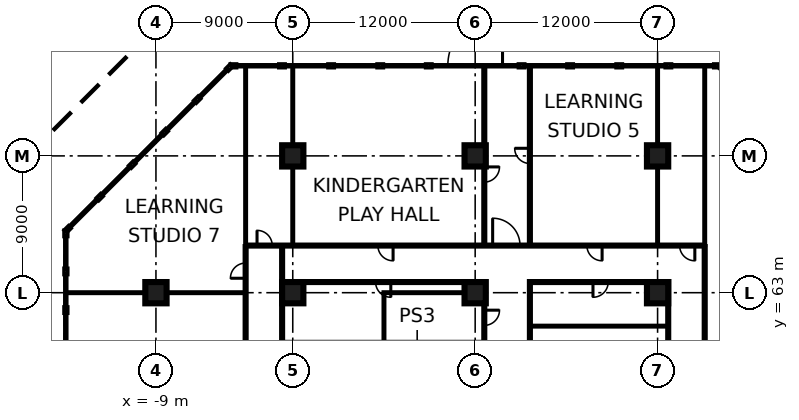
"""IFC4 building model, lengths in metres.
Left out: names, types, materials, properties, quantities, classifications, styles, units other than length and angle.
Written with IfcOpenShell. Run it as: python <this file> out.ifc"""

import sys

from ifc_helpers import new_model, si_unit, direction, frame, frame_2d, origin, origin_2d, place, context, subcontext, project, spatial, rectangle, extrude, element, fill, save


model = new_model("IFC4")
c1 = context("Model", 3, precision=1e-05, world=origin(), true_north=direction((0.0, 1.0)))
c2 = subcontext(c1, "Body", "Model", "MODEL_VIEW")
j1 = project(units=[si_unit("LENGTHUNIT", "METRE"), si_unit("PLANEANGLEUNIT", "RADIAN")], contexts=[c1])
p1 = place(None, origin())
s1 = spatial("IfcSite", under=j1, at=p1, CompositionType="ELEMENT")
p2 = place(p1, origin())
s2 = spatial("IfcBuilding", under=s1, at=p2, CompositionType="ELEMENT")
p3 = place(p2, origin())
s3 = spatial("IfcBuildingStorey", under=s2, at=p3, CompositionType="ELEMENT", Elevation=0.0)
for number, where, z_axis, x_axis in (
    (1, (-9.0, 63.0, 0.0), (0.0, 0.0, 1.0), (1.0, 0.0, 0.0)),
    (2, (0.0, 63.0, 0.0), (0.0, 0.0, 1.0), (1.0, 0.0, 0.0)),
    (3, (12.0, 63.0, 0.0), (0.0, 0.0, 1.0), (1.0, 0.0, 0.0)),
    (4, (24.0, 63.0, 0.0), (0.0, 0.0, 1.0), (1.0, 0.0, 0.0)),
    (5, (0.0, 72.0, 0.0), (0.0, 0.0, 1.0), (1.0, 0.0, 0.0)),
    (6, (12.0, 72.0, 0.0), (0.0, 0.0, 1.0), (1.0, 0.0, 0.0)),
    (7, (24.0, 72.0, 0.0), (0.0, 0.0, 1.0), (1.0, 0.0, 0.0)),
):
    element("IfcColumn", number, at=place(p3, frame(where, z_axis=z_axis, x_axis=x_axis)), inside=s3, PredefinedType="COLUMN", context=c2, shape_type="SweptSolid", body=[
        extrude(rectangle(XDim=1.4, YDim=1.4, at=origin_2d()), origin(), (0.0, 0.0, 1.0), 7.2),
    ])
p4 = place(p3, frame((15.0, 77.925, 0.0), z_axis=(0.0, 0.0, 1.0), x_axis=(-1.0, 0.0, 0.0)))
e8 = element("IfcWall", 8, at=p4, inside=s3, PredefinedType="SOLIDWALL", context=c2, shape_type="SweptSolid", body=[
    extrude(rectangle(XDim=6.0, YDim=0.15, at=frame_2d((3.0, 0.0))), origin(), (0.0, 0.0, 1.0), 6.8),
])
p5 = place(p4, frame((1.2, 0.0, 0.0)))
e9 = element("IfcOpeningElement", 9, at=p5, cuts=e8, PredefinedType="OPENING", context=c2, shape_type="SweptSolid", body=[
    extrude(rectangle(XDim=3.6, YDim=2.8, at=frame_2d((1.8, 1.4))), frame((0.0, 0.085, 0.0), z_axis=(0.0, -1.0, 0.0), x_axis=(1.0, 0.0, 0.0)), (0.0, 0.0, 1.0), 0.17),
])
p6 = place(p3, frame((-14.925, 63.0, 0.0), z_axis=(0.0, 0.0, 1.0), x_axis=(1.0, 0.0, 0.0)))
e10 = element("IfcWall", 10, at=p6, inside=s3, PredefinedType="PARTITIONING", context=c2, shape_type="SweptSolid", body=[
    extrude(rectangle(XDim=11.725, YDim=0.125, at=frame_2d((5.863, 0.0))), origin(), (0.0, 0.0, 1.0), 6.8),
])
p7 = place(p3, frame((-3.1, -3.0, 0.0), z_axis=(0.0, 0.0, 1.0), x_axis=(0.0, 1.0, 0.0)))
e11 = element("IfcWall", 11, at=p7, inside=s3, PredefinedType="PARTITIONING", context=c2, shape_type="SweptSolid", body=[
    extrude(rectangle(XDim=69.1, YDim=0.2, at=frame_2d((34.55, 0.0))), origin(), (0.0, 0.0, 1.0), 6.8),
])
p8 = place(p7, frame((8.6, 0.0, 0.0)))
e12 = element("IfcOpeningElement", 12, at=p8, cuts=e11, PredefinedType="OPENING", context=c2, shape_type="SweptSolid", body=[
    extrude(rectangle(XDim=1.0, YDim=2.1, at=frame_2d((0.5, 1.05))), frame((0.0, 0.11, 0.0), z_axis=(0.0, -1.0, 0.0), x_axis=(1.0, 0.0, 0.0)), (0.0, 0.0, 1.0), 0.22),
])
p9 = place(p7, frame((13.85, 0.0, 0.0)))
e13 = element("IfcOpeningElement", 13, at=p9, cuts=e11, PredefinedType="OPENING", context=c2, shape_type="SweptSolid", body=[
    extrude(rectangle(XDim=1.0, YDim=2.1, at=frame_2d((0.5, 1.05))), frame((0.0, 0.11, 0.0), z_axis=(0.0, -1.0, 0.0), x_axis=(1.0, 0.0, 0.0)), (0.0, 0.0, 1.0), 0.22),
])
p10 = place(p7, frame((18.6, 0.0, 0.0)))
e14 = element("IfcOpeningElement", 14, at=p10, cuts=e11, PredefinedType="OPENING", context=c2, shape_type="SweptSolid", body=[
    extrude(rectangle(XDim=1.0, YDim=2.1, at=frame_2d((0.5, 1.05))), frame((0.0, 0.11, 0.0), z_axis=(0.0, -1.0, 0.0), x_axis=(1.0, 0.0, 0.0)), (0.0, 0.0, 1.0), 0.22),
])
p11 = place(p7, frame((66.95, 0.0, 0.0)))
e15 = element("IfcOpeningElement", 15, at=p11, cuts=e11, PredefinedType="OPENING", context=c2, shape_type="SweptSolid", body=[
    extrude(rectangle(XDim=1.0, YDim=2.1, at=frame_2d((0.5, 1.05))), frame((0.0, 0.11, 0.0), z_axis=(0.0, -1.0, 0.0), x_axis=(1.0, 0.0, 0.0)), (0.0, 0.0, 1.0), 0.22),
])
p12 = place(p7, frame((59.85, 0.0, 0.0)))
e16 = element("IfcOpeningElement", 16, at=p12, cuts=e11, PredefinedType="OPENING", context=c2, shape_type="SweptSolid", body=[
    extrude(rectangle(XDim=1.8, YDim=2.1, at=frame_2d((0.9, 1.05))), frame((0.0, 0.11, 0.0), z_axis=(0.0, -1.0, 0.0), x_axis=(1.0, 0.0, 0.0)), (0.0, 0.0, 1.0), 0.22),
])
p13 = place(p7, frame((49.85, 0.0, 0.0)))
e17 = element("IfcOpeningElement", 17, at=p13, cuts=e11, PredefinedType="OPENING", context=c2, shape_type="SweptSolid", body=[
    extrude(rectangle(XDim=1.8, YDim=2.1, at=frame_2d((0.9, 1.05))), frame((0.0, 0.11, 0.0), z_axis=(0.0, -1.0, 0.0), x_axis=(1.0, 0.0, 0.0)), (0.0, 0.0, 1.0), 0.22),
])
p14 = place(p7, frame((29.85, 0.0, 0.0)))
e18 = element("IfcOpeningElement", 18, at=p14, cuts=e11, PredefinedType="OPENING", context=c2, shape_type="SweptSolid", body=[
    extrude(rectangle(XDim=1.8, YDim=2.1, at=frame_2d((0.9, 1.05))), frame((0.0, 0.11, 0.0), z_axis=(0.0, -1.0, 0.0), x_axis=(1.0, 0.0, 0.0)), (0.0, 0.0, 1.0), 0.22),
])
p15 = place(p7, frame((39.6, 0.0, 0.0)))
e19 = element("IfcOpeningElement", 19, at=p15, cuts=e11, PredefinedType="OPENING", context=c2, shape_type="SweptSolid", body=[
    extrude(rectangle(XDim=1.8, YDim=2.1, at=frame_2d((0.9, 1.05))), frame((0.0, 0.11, 0.0), z_axis=(0.0, -1.0, 0.0), x_axis=(1.0, 0.0, 0.0)), (0.0, 0.0, 1.0), 0.22),
])
p16 = place(p7, frame((23.55, 0.0, 0.0)))
e20 = element("IfcOpeningElement", 20, at=p16, cuts=e11, PredefinedType="OPENING", context=c2, shape_type="SweptSolid", body=[
    extrude(rectangle(XDim=1.8, YDim=2.1, at=frame_2d((0.9, 1.05))), frame((0.0, 0.11, 0.0), z_axis=(0.0, -1.0, 0.0), x_axis=(1.0, 0.0, 0.0)), (0.0, 0.0, 1.0), 0.22),
])
p17 = place(p3, frame((-3.1, 66.1, 0.0), z_axis=(0.0, 0.0, 1.0), x_axis=(0.0, 1.0, 0.0)))
e21 = element("IfcWall", 21, at=p17, inside=s3, PredefinedType="PARTITIONING", context=c2, shape_type="SweptSolid", body=[
    extrude(rectangle(XDim=11.825, YDim=0.125, at=frame_2d((5.913, 0.0))), origin(), (0.0, 0.0, 1.0), 6.8),
])
p18 = place(p3, frame((-3.0, 66.1, 0.0), z_axis=(0.0, 0.0, 1.0), x_axis=(1.0, 0.0, 0.0)))
e22 = element("IfcWall", 22, at=p18, inside=s3, PredefinedType="PARTITIONING", context=c2, shape_type="SweptSolid", body=[
    extrude(rectangle(XDim=30.0, YDim=0.2, at=frame_2d((15.0, 0.0))), origin(), (0.0, 0.0, 1.0), 6.8),
])
p19 = place(p18, frame((0.65, 0.0, 0.0)))
e23 = element("IfcOpeningElement", 23, at=p19, cuts=e22, PredefinedType="OPENING", context=c2, shape_type="SweptSolid", body=[
    extrude(rectangle(XDim=1.0, YDim=2.1, at=frame_2d((0.5, 1.05))), frame((0.0, 0.11, 0.0), z_axis=(0.0, -1.0, 0.0), x_axis=(1.0, 0.0, 0.0)), (0.0, 0.0, 1.0), 0.22),
])
p20 = place(p18, frame((8.6, 0.0, 0.0)))
e24 = element("IfcOpeningElement", 24, at=p20, cuts=e22, PredefinedType="OPENING", context=c2, shape_type="SweptSolid", body=[
    extrude(rectangle(XDim=1.0, YDim=2.1, at=frame_2d((0.5, 1.05))), frame((0.0, 0.11, 0.0), z_axis=(0.0, -1.0, 0.0), x_axis=(1.0, 0.0, 0.0)), (0.0, 0.0, 1.0), 0.22),
])
p21 = place(p18, frame((22.35, 0.0, 0.0)))
e25 = element("IfcOpeningElement", 25, at=p21, cuts=e22, PredefinedType="OPENING", context=c2, shape_type="SweptSolid", body=[
    extrude(rectangle(XDim=1.0, YDim=2.1, at=frame_2d((0.5, 1.05))), frame((0.0, 0.11, 0.0), z_axis=(0.0, -1.0, 0.0), x_axis=(1.0, 0.0, 0.0)), (0.0, 0.0, 1.0), 0.22),
])
p22 = place(p18, frame((28.45, 0.0, 0.0)))
e26 = element("IfcOpeningElement", 26, at=p22, cuts=e22, PredefinedType="OPENING", context=c2, shape_type="SweptSolid", body=[
    extrude(rectangle(XDim=1.0, YDim=2.1, at=frame_2d((0.5, 1.05))), frame((0.0, 0.11, 0.0), z_axis=(0.0, -1.0, 0.0), x_axis=(1.0, 0.0, 0.0)), (0.0, 0.0, 1.0), 0.22),
])
p23 = place(p18, frame((16.15, 0.0, 0.0)))
e27 = element("IfcOpeningElement", 27, at=p23, cuts=e22, PredefinedType="OPENING", context=c2, shape_type="SweptSolid", body=[
    extrude(rectangle(XDim=1.8, YDim=2.1, at=frame_2d((0.9, 1.05))), frame((0.0, 0.11, 0.0), z_axis=(0.0, -1.0, 0.0), x_axis=(1.0, 0.0, 0.0)), (0.0, 0.0, 1.0), 0.22),
])
p24 = place(p3, frame((-0.7, 59.6, 0.0), z_axis=(0.0, 0.0, 1.0), x_axis=(0.0, 1.0, 0.0)))
e28 = element("IfcWall", 28, at=p24, inside=s3, PredefinedType="PARTITIONING", context=c2, shape_type="SweptSolid", body=[
    extrude(rectangle(XDim=6.4, YDim=0.2, at=frame_2d((3.2, 0.0))), origin(), (0.0, 0.0, 1.0), 6.8),
])
p25 = place(p3, frame((-0.6, 63.7, 0.0), z_axis=(0.0, 0.0, 1.0), x_axis=(1.0, 0.0, 0.0)))
e29 = element("IfcWall", 29, at=p25, inside=s3, PredefinedType="PARTITIONING", context=c2, shape_type="SweptSolid", body=[
    extrude(rectangle(XDim=13.3, YDim=0.2, at=frame_2d((6.65, 0.0))), origin(), (0.0, 0.0, 1.0), 6.8),
])
p26 = place(p25, frame((6.05, 0.0, 0.0)))
e30 = element("IfcOpeningElement", 30, at=p26, cuts=e29, PredefinedType="OPENING", context=c2, shape_type="SweptSolid", body=[
    extrude(rectangle(XDim=1.0, YDim=2.1, at=frame_2d((0.5, 1.05))), frame((0.0, 0.11, 0.0), z_axis=(0.0, -1.0, 0.0), x_axis=(1.0, 0.0, 0.0)), (0.0, 0.0, 1.0), 0.22),
])
p27 = place(p3, frame((0.0, 66.2, 0.0), z_axis=(0.0, 0.0, 1.0), x_axis=(0.0, 1.0, 0.0)))
e31 = element("IfcWall", 31, at=p27, inside=s3, PredefinedType="PARTITIONING", context=c2, shape_type="SweptSolid", body=[
    extrude(rectangle(XDim=11.725, YDim=0.125, at=frame_2d((5.863, 0.0))), origin(), (0.0, 0.0, 1.0), 6.8),
])
p28 = place(p3, frame((5.938, 63.0, 0.0), z_axis=(0.0, 0.0, 1.0), x_axis=(1.0, 0.0, 0.0)))
e32 = element("IfcWall", 32, at=p28, inside=s3, PredefinedType="PARTITIONING", context=c2, shape_type="SweptSolid", body=[
    extrude(rectangle(XDim=6.562, YDim=0.125, at=frame_2d((3.281, 0.0))), origin(), (0.0, 0.0, 1.0), 6.8),
])
p29 = place(p3, frame((6.0, 59.7, 0.0), z_axis=(0.0, 0.0, 1.0), x_axis=(0.0, 1.0, 0.0)))
e33 = element("IfcWall", 33, at=p29, inside=s3, PredefinedType="PARTITIONING", context=c2, shape_type="SweptSolid", body=[
    extrude(rectangle(XDim=3.238, YDim=0.125, at=frame_2d((1.619, 0.0))), origin(), (0.0, 0.0, 1.0), 6.8),
])
p30 = place(p3, frame((12.6, 59.6, 0.0), z_axis=(0.0, 0.0, 1.0), x_axis=(0.0, 1.0, 0.0)))
e34 = element("IfcWall", 34, at=p30, inside=s3, PredefinedType="PARTITIONING", context=c2, shape_type="SweptSolid", body=[
    extrude(rectangle(XDim=4.0, YDim=0.2, at=frame_2d((2.0, 0.0))), origin(), (0.0, 0.0, 1.0), 6.8),
])
p31 = place(p30, frame((1.25, 0.0, 0.0)))
e35 = element("IfcOpeningElement", 35, at=p31, cuts=e34, PredefinedType="OPENING", context=c2, shape_type="SweptSolid", body=[
    extrude(rectangle(XDim=1.0, YDim=2.1, at=frame_2d((0.5, 1.05))), frame((0.0, 0.11, 0.0), z_axis=(0.0, -1.0, 0.0), x_axis=(1.0, 0.0, 0.0)), (0.0, 0.0, 1.0), 0.22),
])
p32 = place(p3, frame((12.6, 66.2, 0.0), z_axis=(0.0, 0.0, 1.0), x_axis=(0.0, 1.0, 0.0)))
e36 = element("IfcWall", 36, at=p32, inside=s3, PredefinedType="PARTITIONING", context=c2, shape_type="SweptSolid", body=[
    extrude(rectangle(XDim=11.651, YDim=0.2, at=frame_2d((5.826, 0.0))), origin(), (0.0, 0.0, 1.0), 6.8),
])
p33 = place(p32, frame((4.075, 0.0, 0.0)))
e37 = element("IfcOpeningElement", 37, at=p33, cuts=e36, PredefinedType="OPENING", context=c2, shape_type="SweptSolid", body=[
    extrude(rectangle(XDim=1.0, YDim=2.1, at=frame_2d((0.5, 1.05))), frame((0.0, 0.11, 0.0), z_axis=(0.0, -1.0, 0.0), x_axis=(1.0, 0.0, 0.0)), (0.0, 0.0, 1.0), 0.22),
])
p34 = place(p3, frame((15.6, 51.225, 0.0), z_axis=(0.0, 0.0, 1.0), x_axis=(0.0, 1.0, 0.0)))
e38 = element("IfcWall", 38, at=p34, inside=s3, PredefinedType="PARTITIONING", context=c2, shape_type="SweptSolid", body=[
    extrude(rectangle(XDim=12.575, YDim=0.2, at=frame_2d((6.288, 0.0))), origin(), (0.0, 0.0, 1.0), 6.8),
])
p35 = place(p34, frame((6.025, 0.0, 0.0)))
e39 = element("IfcOpeningElement", 39, at=p35, cuts=e38, PredefinedType="OPENING", context=c2, shape_type="SweptSolid", body=[
    extrude(rectangle(XDim=1.0, YDim=2.1, at=frame_2d((0.5, 1.05))), frame((0.0, 0.11, 0.0), z_axis=(0.0, -1.0, 0.0), x_axis=(1.0, 0.0, 0.0)), (0.0, 0.0, 1.0), 0.22),
])
p36 = place(p3, frame((15.6, 66.2, 0.0), z_axis=(0.0, 0.0, 1.0), x_axis=(0.0, 1.0, 0.0)))
e40 = element("IfcWall", 40, at=p36, inside=s3, PredefinedType="PARTITIONING", context=c2, shape_type="SweptSolid", body=[
    extrude(rectangle(XDim=11.725, YDim=0.2, at=frame_2d((5.863, 0.0))), origin(), (0.0, 0.0, 1.0), 6.8),
])
p37 = place(p36, frame((5.3, 0.0, 0.0)))
e41 = element("IfcOpeningElement", 41, at=p37, cuts=e40, PredefinedType="OPENING", context=c2, shape_type="SweptSolid", body=[
    extrude(rectangle(XDim=1.0, YDim=2.1, at=frame_2d((0.5, 1.05))), frame((0.0, 0.11, 0.0), z_axis=(0.0, -1.0, 0.0), x_axis=(1.0, 0.0, 0.0)), (0.0, 0.0, 1.0), 0.22),
])
p38 = place(p3, frame((15.7, 60.8, 0.0), z_axis=(0.0, 0.0, 1.0), x_axis=(1.0, 0.0, 0.0)))
e42 = element("IfcWall", 42, at=p38, inside=s3, PredefinedType="PARTITIONING", context=c2, shape_type="SweptSolid", body=[
    extrude(rectangle(XDim=8.9, YDim=0.125, at=frame_2d((4.45, 0.0))), origin(), (0.0, 0.0, 1.0), 6.8),
])
p39 = place(p3, frame((15.7, 63.7, 0.0), z_axis=(0.0, 0.0, 1.0), x_axis=(1.0, 0.0, 0.0)))
e43 = element("IfcWall", 43, at=p39, inside=s3, PredefinedType="PARTITIONING", context=c2, shape_type="SweptSolid", body=[
    extrude(rectangle(XDim=8.9, YDim=0.2, at=frame_2d((4.45, 0.0))), origin(), (0.0, 0.0, 1.0), 6.8),
])
p40 = place(p39, frame((4.05, 0.0, 0.0)))
e44 = element("IfcOpeningElement", 44, at=p40, cuts=e43, PredefinedType="OPENING", context=c2, shape_type="SweptSolid", body=[
    extrude(rectangle(XDim=1.0, YDim=2.1, at=frame_2d((0.5, 1.05))), frame((0.0, 0.11, 0.0), z_axis=(0.0, -1.0, 0.0), x_axis=(1.0, 0.0, 0.0)), (0.0, 0.0, 1.0), 0.22),
])
p41 = place(p3, frame((24.0, 66.2, 0.0), z_axis=(0.0, 0.0, 1.0), x_axis=(0.0, 1.0, 0.0)))
e45 = element("IfcWall", 45, at=p41, inside=s3, PredefinedType="PARTITIONING", context=c2, shape_type="SweptSolid", body=[
    extrude(rectangle(XDim=11.725, YDim=0.125, at=frame_2d((5.863, 0.0))), origin(), (0.0, 0.0, 1.0), 6.8),
])
p42 = place(p3, frame((24.7, 44.3, 0.0), z_axis=(0.0, 0.0, 1.0), x_axis=(0.0, 1.0, 0.0)))
e46 = element("IfcWall", 46, at=p42, inside=s3, PredefinedType="PARTITIONING", context=c2, shape_type="SweptSolid", body=[
    extrude(rectangle(XDim=19.5, YDim=0.2, at=frame_2d((9.75, 0.0))), origin(), (0.0, 0.0, 1.0), 6.8),
])
p43 = place(p42, frame((1.45, 0.0, 0.0)))
e47 = element("IfcOpeningElement", 47, at=p43, cuts=e46, PredefinedType="OPENING", context=c2, shape_type="SweptSolid", body=[
    extrude(rectangle(XDim=1.0, YDim=2.1, at=frame_2d((0.5, 1.05))), frame((0.0, 0.11, 0.0), z_axis=(0.0, -1.0, 0.0), x_axis=(1.0, 0.0, 0.0)), (0.0, 0.0, 1.0), 0.22),
])
p44 = place(p42, frame((6.65, 0.0, 0.0)))
e48 = element("IfcOpeningElement", 48, at=p44, cuts=e46, PredefinedType="OPENING", context=c2, shape_type="SweptSolid", body=[
    extrude(rectangle(XDim=1.0, YDim=2.1, at=frame_2d((0.5, 1.05))), frame((0.0, 0.11, 0.0), z_axis=(0.0, -1.0, 0.0), x_axis=(1.0, 0.0, 0.0)), (0.0, 0.0, 1.0), 0.22),
])
p45 = place(p3, frame((27.1, 38.5, 0.0), z_axis=(0.0, 0.0, 1.0), x_axis=(0.0, 1.0, 0.0)))
e49 = element("IfcWall", 49, at=p45, inside=s3, PredefinedType="PARTITIONING", context=c2, shape_type="SweptSolid", body=[
    extrude(rectangle(XDim=27.6, YDim=0.2, at=frame_2d((13.8, 0.0))), origin(), (0.0, 0.0, 1.0), 6.8),
])
p46 = place(p45, frame((13.05, 0.0, 0.0)))
e50 = element("IfcOpeningElement", 50, at=p46, cuts=e49, PredefinedType="OPENING", context=c2, shape_type="SweptSolid", body=[
    extrude(rectangle(XDim=1.8, YDim=2.1, at=frame_2d((0.9, 1.05))), frame((0.0, 0.11, 0.0), z_axis=(0.0, -1.0, 0.0), x_axis=(1.0, 0.0, 0.0)), (0.0, 0.0, 1.0), 0.22),
])
p47 = place(p45, frame((3.05, 0.0, 0.0)))
e51 = element("IfcOpeningElement", 51, at=p47, cuts=e49, PredefinedType="OPENING", context=c2, shape_type="SweptSolid", body=[
    extrude(rectangle(XDim=1.8, YDim=2.1, at=frame_2d((0.9, 1.05))), frame((0.0, 0.11, 0.0), z_axis=(0.0, -1.0, 0.0), x_axis=(1.0, 0.0, 0.0)), (0.0, 0.0, 1.0), 0.22),
])
p48 = place(p3, frame((27.1, 66.1, 0.0), z_axis=(0.0, 0.0, 1.0), x_axis=(0.0, 1.0, 0.0)))
e52 = element("IfcWall", 52, at=p48, inside=s3, PredefinedType="PARTITIONING", context=c2, shape_type="SweptSolid", body=[
    extrude(rectangle(XDim=11.825, YDim=0.125, at=frame_2d((5.913, 0.0))), origin(), (0.0, 0.0, 1.0), 6.8),
])
p49 = place(p5, frame((3.6, 0.0, 0.0), z_axis=(0.0, 0.0, 1.0), x_axis=(-1.0, 0.0, 0.0)))
e53 = element("IfcDoor", 53, at=p49, inside=s3, OperationType="DOUBLE_DOOR_SINGLE_SWING", PredefinedType="DOOR", context=c2, shape_type="SweptSolid", body=[
    extrude(rectangle(XDim=3.6, YDim=2.8, at=frame_2d((1.8, 1.4))), frame((0.0, 0.025, 0.0), z_axis=(0.0, -1.0, 0.0), x_axis=(1.0, 0.0, 0.0)), (0.0, 0.0, 1.0), 0.05),
])
fill(e9, e53)
p50 = place(p31, origin())
e54 = element("IfcDoor", 54, at=p50, inside=s3, OperationType="SINGLE_SWING_RIGHT", PredefinedType="DOOR", context=c2, shape_type="SweptSolid", body=[
    extrude(rectangle(XDim=1.0, YDim=2.1, at=frame_2d((0.5, 1.05))), frame((0.0, 0.025, 0.0), z_axis=(0.0, -1.0, 0.0), x_axis=(1.0, 0.0, 0.0)), (0.0, 0.0, 1.0), 0.05),
])
fill(e35, e54)
p51 = place(p40, frame((1.0, 0.0, 0.0), z_axis=(0.0, 0.0, 1.0), x_axis=(-1.0, 0.0, 0.0)))
e55 = element("IfcDoor", 55, at=p51, inside=s3, OperationType="SINGLE_SWING_LEFT", PredefinedType="DOOR", context=c2, shape_type="SweptSolid", body=[
    extrude(rectangle(XDim=1.0, YDim=2.1, at=frame_2d((0.5, 1.05))), frame((0.0, 0.025, 0.0), z_axis=(0.0, -1.0, 0.0), x_axis=(1.0, 0.0, 0.0)), (0.0, 0.0, 1.0), 0.05),
])
fill(e44, e55)
p52 = place(p26, origin())
e56 = element("IfcDoor", 56, at=p52, inside=s3, OperationType="SINGLE_SWING_RIGHT", PredefinedType="DOOR", context=c2, shape_type="SweptSolid", body=[
    extrude(rectangle(XDim=1.0, YDim=2.1, at=frame_2d((0.5, 1.05))), frame((0.0, 0.025, 0.0), z_axis=(0.0, -1.0, 0.0), x_axis=(1.0, 0.0, 0.0)), (0.0, 0.0, 1.0), 0.05),
])
fill(e30, e56)
p53 = place(p19, origin())
e57 = element("IfcDoor", 57, at=p53, inside=s3, OperationType="SINGLE_SWING_LEFT", PredefinedType="DOOR", context=c2, shape_type="SweptSolid", body=[
    extrude(rectangle(XDim=1.0, YDim=2.1, at=frame_2d((0.5, 1.05))), frame((0.0, 0.025, 0.0), z_axis=(0.0, -1.0, 0.0), x_axis=(1.0, 0.0, 0.0)), (0.0, 0.0, 1.0), 0.05),
])
fill(e23, e57)
p54 = place(p20, origin())
e58 = element("IfcDoor", 58, at=p54, inside=s3, OperationType="SINGLE_SWING_RIGHT", PredefinedType="DOOR", context=c2, shape_type="SweptSolid", body=[
    extrude(rectangle(XDim=1.0, YDim=2.1, at=frame_2d((0.5, 1.05))), frame((0.0, 0.025, 0.0), z_axis=(0.0, -1.0, 0.0), x_axis=(1.0, 0.0, 0.0)), (0.0, 0.0, 1.0), 0.05),
])
fill(e24, e58)
p55 = place(p33, origin())
e59 = element("IfcDoor", 59, at=p55, inside=s3, OperationType="SINGLE_SWING_RIGHT", PredefinedType="DOOR", context=c2, shape_type="SweptSolid", body=[
    extrude(rectangle(XDim=1.0, YDim=2.1, at=frame_2d((0.5, 1.05))), frame((0.0, 0.025, 0.0), z_axis=(0.0, -1.0, 0.0), x_axis=(1.0, 0.0, 0.0)), (0.0, 0.0, 1.0), 0.05),
])
fill(e37, e59)
p56 = place(p37, frame((1.0, 0.0, 0.0), z_axis=(0.0, 0.0, 1.0), x_axis=(-1.0, 0.0, 0.0)))
e60 = element("IfcDoor", 60, at=p56, inside=s3, OperationType="SINGLE_SWING_RIGHT", PredefinedType="DOOR", context=c2, shape_type="SweptSolid", body=[
    extrude(rectangle(XDim=1.0, YDim=2.1, at=frame_2d((0.5, 1.05))), frame((0.0, 0.025, 0.0), z_axis=(0.0, -1.0, 0.0), x_axis=(1.0, 0.0, 0.0)), (0.0, 0.0, 1.0), 0.05),
])
fill(e41, e60)
p57 = place(p21, origin())
e61 = element("IfcDoor", 61, at=p57, inside=s3, OperationType="SINGLE_SWING_RIGHT", PredefinedType="DOOR", context=c2, shape_type="SweptSolid", body=[
    extrude(rectangle(XDim=1.0, YDim=2.1, at=frame_2d((0.5, 1.05))), frame((0.0, 0.025, 0.0), z_axis=(0.0, -1.0, 0.0), x_axis=(1.0, 0.0, 0.0)), (0.0, 0.0, 1.0), 0.05),
])
fill(e25, e61)
p58 = place(p22, origin())
e62 = element("IfcDoor", 62, at=p58, inside=s3, OperationType="SINGLE_SWING_RIGHT", PredefinedType="DOOR", context=c2, shape_type="SweptSolid", body=[
    extrude(rectangle(XDim=1.0, YDim=2.1, at=frame_2d((0.5, 1.05))), frame((0.0, 0.025, 0.0), z_axis=(0.0, -1.0, 0.0), x_axis=(1.0, 0.0, 0.0)), (0.0, 0.0, 1.0), 0.05),
])
fill(e26, e62)
p59 = place(p11, origin())
e63 = element("IfcDoor", 63, at=p59, inside=s3, OperationType="SINGLE_SWING_LEFT", PredefinedType="DOOR", context=c2, shape_type="SweptSolid", body=[
    extrude(rectangle(XDim=1.0, YDim=2.1, at=frame_2d((0.5, 1.05))), frame((0.0, 0.025, 0.0), z_axis=(0.0, -1.0, 0.0), x_axis=(1.0, 0.0, 0.0)), (0.0, 0.0, 1.0), 0.05),
])
fill(e15, e63)
p60 = place(p23, origin())
e64 = element("IfcDoor", 64, at=p60, inside=s3, OperationType="DOUBLE_DOOR_SINGLE_SWING", PredefinedType="DOOR", context=c2, shape_type="SweptSolid", body=[
    extrude(rectangle(XDim=1.8, YDim=2.1, at=frame_2d((0.9, 1.05))), frame((0.0, 0.025, 0.0), z_axis=(0.0, -1.0, 0.0), x_axis=(1.0, 0.0, 0.0)), (0.0, 0.0, 1.0), 0.05),
])
fill(e27, e64)
save(model, sys.argv[1])
